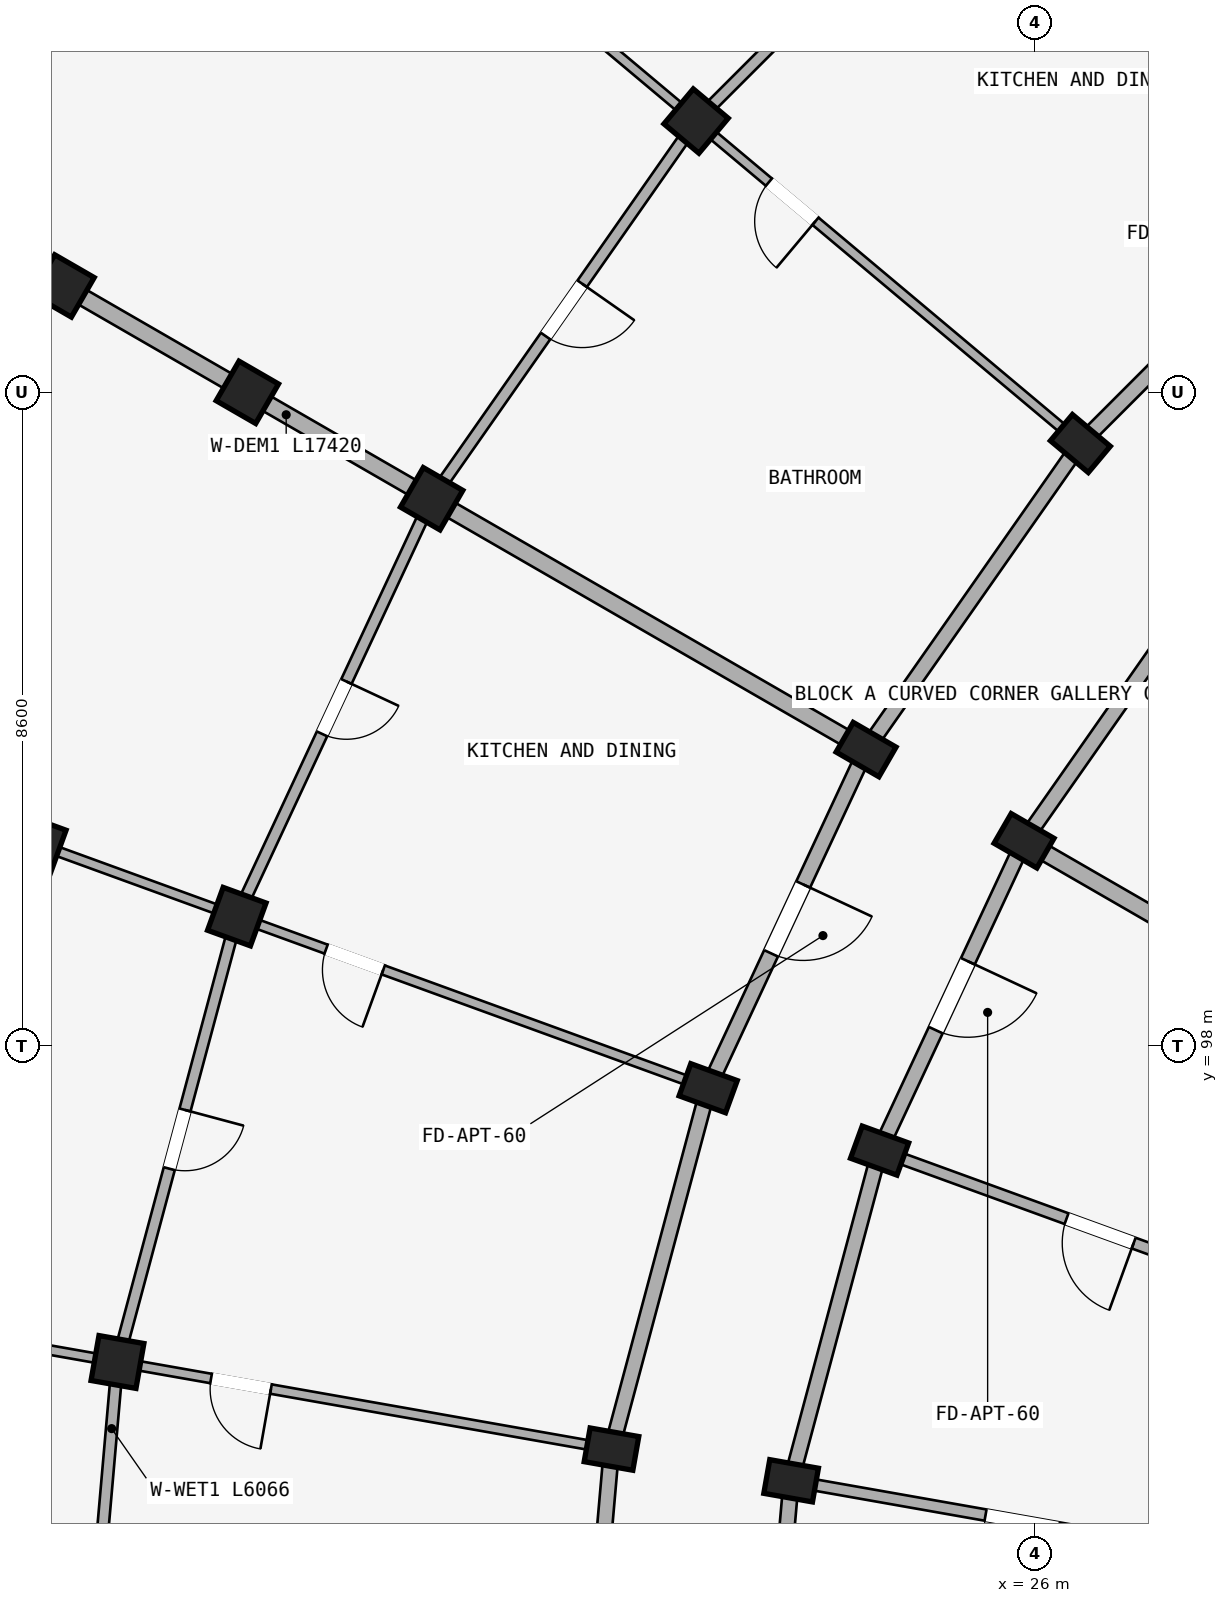
"""IFC4 building model, lengths in metres.
Left out: names, types, materials, properties, quantities, classifications, styles, units other than length and angle.
Written with IfcOpenShell. Run it as: python <this file> out.ifc"""

import sys

from ifc_helpers import new_model, si_unit, direction, frame, frame_2d, origin, origin_2d, place, context, subcontext, project, spatial, rectangle, extrude, element, fill, save


model = new_model("IFC4")
c1 = context("Model", 3, precision=1e-05, world=origin(), true_north=direction((0.0, 1.0)))
c2 = subcontext(c1, "Body", "Model", "MODEL_VIEW")
j1 = project(units=[si_unit("LENGTHUNIT", "METRE"), si_unit("PLANEANGLEUNIT", "RADIAN")], contexts=[c1])
p1 = place(None, origin())
s1 = spatial("IfcSite", under=j1, at=p1, CompositionType="ELEMENT")
p2 = place(p1, origin())
s2 = spatial("IfcBuilding", under=s1, at=p2, CompositionType="ELEMENT")
p3 = place(p2, frame((0.0, 0.0, 37.05)))
s3 = spatial("IfcBuildingStorey", under=s2, at=p3, CompositionType="ELEMENT", Elevation=37.05)
p4 = place(p3, frame((26.598, 105.927, 0.0), z_axis=(0.0, 0.0, 1.0), x_axis=(0.642787609687, 0.766044443119, 0.0)))
e1 = element("IfcColumn", 1, at=p4, inside=s3, PredefinedType="COLUMN", context=c2, shape_type="SweptSolid", body=[
    extrude(rectangle(XDim=0.45, YDim=0.65, at=origin_2d()), origin(), (0.0, 0.0, 1.0), 2.93),
])
p5 = place(p3, frame((21.542, 110.169, 0.0), z_axis=(0.0, 0.0, 1.0), x_axis=(0.642787609687, 0.766044443119, 0.0)))
e2 = element("IfcColumn", 2, at=p5, inside=s3, PredefinedType="COLUMN", context=c2, shape_type="SweptSolid", body=[
    extrude(rectangle(XDim=0.6, YDim=0.6, at=origin_2d()), origin(), (0.0, 0.0, 1.0), 2.93),
])
for number, where, z_axis, x_axis in (
    (3, (25.856, 100.7, 0.0), (0.0, 0.0, 1.0), (0.5, 0.866, 0.0)),
    (4, (23.778, 101.9, 0.0), (0.0, 0.0, 1.0), (0.5, 0.866, 0.0)),
):
    element("IfcColumn", number, at=place(p3, frame(where, z_axis=z_axis, x_axis=x_axis)), inside=s3, PredefinedType="COLUMN", context=c2, shape_type="SweptSolid", body=[
        extrude(rectangle(XDim=0.45, YDim=0.65, at=origin_2d()), origin(), (0.0, 0.0, 1.0), 2.93),
    ])
for number, where, z_axis, x_axis in (
    (5, (18.062, 105.2, 0.0), (0.0, 0.0, 1.0), (0.5, 0.866, 0.0)),
    (6, (15.637, 106.6, 0.0), (0.0, 0.0, 1.0), (0.5, 0.866, 0.0)),
    (7, (13.213, 108.0, 0.0), (0.0, 0.0, 1.0), (0.5, 0.866, 0.0)),
):
    element("IfcColumn", number, at=place(p3, frame(where, z_axis=z_axis, x_axis=x_axis)), inside=s3, PredefinedType="COLUMN", context=c2, shape_type="SweptSolid", body=[
        extrude(rectangle(XDim=0.6, YDim=0.6, at=origin_2d()), origin(), (0.0, 0.0, 1.0), 2.93),
    ])
for number, where, z_axis, x_axis in (
    (8, (23.956, 96.624, 0.0), (0.0, 0.0, 1.0), (0.342, 0.94, 0.0)),
    (9, (21.701, 97.445, 0.0), (0.0, 0.0, 1.0), (0.342, 0.94, 0.0)),
):
    element("IfcColumn", number, at=place(p3, frame(where, z_axis=z_axis, x_axis=x_axis)), inside=s3, PredefinedType="COLUMN", context=c2, shape_type="SweptSolid", body=[
        extrude(rectangle(XDim=0.45, YDim=0.65, at=origin_2d()), origin(), (0.0, 0.0, 1.0), 2.93),
    ])
for number, where, z_axis, x_axis in (
    (10, (15.499, 99.702, 0.0), (0.0, 0.0, 1.0), (0.342, 0.94, 0.0)),
    (11, (12.868, 100.66, 0.0), (0.0, 0.0, 1.0), (0.342, 0.94, 0.0)),
):
    element("IfcColumn", number, at=place(p3, frame(where, z_axis=z_axis, x_axis=x_axis)), inside=s3, PredefinedType="COLUMN", context=c2, shape_type="SweptSolid", body=[
        extrude(rectangle(XDim=0.6, YDim=0.6, at=origin_2d()), origin(), (0.0, 0.0, 1.0), 2.93),
    ])
for number, where, z_axis, x_axis in (
    (12, (22.792, 92.28, 0.0), (0.0, 0.0, 1.0), (0.174, 0.985, 0.0)),
    (13, (20.428, 92.697, 0.0), (0.0, 0.0, 1.0), (0.174, 0.985, 0.0)),
):
    element("IfcColumn", number, at=place(p3, frame(where, z_axis=z_axis, x_axis=x_axis)), inside=s3, PredefinedType="COLUMN", context=c2, shape_type="SweptSolid", body=[
        extrude(rectangle(XDim=0.45, YDim=0.65, at=origin_2d()), origin(), (0.0, 0.0, 1.0), 2.93),
    ])
p6 = place(p3, frame((13.929, 93.843, 0.0), z_axis=(0.0, 0.0, 1.0), x_axis=(0.173648177667, 0.984807753012, 0.0)))
e14 = element("IfcColumn", 14, at=p6, inside=s3, PredefinedType="COLUMN", context=c2, shape_type="SweptSolid", body=[
    extrude(rectangle(XDim=0.6, YDim=0.6, at=origin_2d()), origin(), (0.0, 0.0, 1.0), 2.93),
])
p7 = place(p3, frame((30.073, 109.402, 0.0), z_axis=(0.0, 0.0, 1.0), x_axis=(-0.707106781187, -0.707106781187, 0.0)))
e15 = element("IfcWall", 15, at=p7, inside=s3, PredefinedType="STANDARD", context=c2, shape_type="SweptSolid", body=[
    extrude(rectangle(XDim=4.916, YDim=0.2, at=frame_2d((2.458, 0.0))), origin(), (0.0, 0.0, 1.0), 2.372),
])
p8 = place(p7, frame((1.888, 0.0, 0.0)))
e16 = element("IfcOpeningElement", 16, at=p8, cuts=e15, PredefinedType="OPENING", context=c2, shape_type="SweptSolid", body=[
    extrude(rectangle(XDim=1.14, YDim=2.15, at=frame_2d((0.57, 1.075))), frame((0.0, 0.11, 0.0), z_axis=(0.0, -1.0, 0.0), x_axis=(1.0, 0.0, 0.0)), (0.0, 0.0, 1.0), 0.22),
])
p9 = place(p3, frame((28.436, 104.384, 0.0), z_axis=(0.0, 0.0, 1.0), x_axis=(-0.573571637217, -0.819155404658, 0.0)))
e17 = element("IfcWall", 17, at=p9, inside=s3, PredefinedType="STANDARD", context=c2, shape_type="SweptSolid", body=[
    extrude(rectangle(XDim=4.497, YDim=0.2, at=frame_2d((2.249, 0.0))), origin(), (0.0, 0.0, 1.0), 2.372),
])
p10 = place(p3, frame((26.598, 105.927, 0.0), z_axis=(0.0, 0.0, 1.0), x_axis=(-0.573592335331, -0.819140911474, 0.0)))
e18 = element("IfcWall", 18, at=p10, inside=s3, PredefinedType="STANDARD", context=c2, shape_type="SweptSolid", body=[
    extrude(rectangle(XDim=4.916, YDim=0.2, at=frame_2d((2.458, 0.0))), origin(), (0.0, 0.0, 1.0), 2.372),
])
p11 = place(p3, frame((25.856, 100.7, 0.0), z_axis=(0.0, 0.0, 1.0), x_axis=(-0.422617978463, -0.906307919131, 0.0)))
e19 = element("IfcWall", 19, at=p11, inside=s3, PredefinedType="STANDARD", context=c2, shape_type="SweptSolid", body=[
    extrude(rectangle(XDim=4.497, YDim=0.2, at=frame_2d((2.249, 0.0))), origin(), (0.0, 0.0, 1.0), 2.372),
])
p12 = place(p11, frame((1.749, 0.0, 0.0)))
e20 = element("IfcOpeningElement", 20, at=p12, cuts=e19, PredefinedType="OPENING", context=c2, shape_type="SweptSolid", body=[
    extrude(rectangle(XDim=1.0, YDim=2.15, at=frame_2d((0.5, 1.075))), frame((0.0, 0.11, 0.0), z_axis=(0.0, -1.0, 0.0), x_axis=(1.0, 0.0, 0.0)), (0.0, 0.0, 1.0), 0.22),
])
p13 = place(p3, frame((23.778, 101.9, 0.0), z_axis=(0.0, 0.0, 1.0), x_axis=(-0.422629854778, -0.906302381024, 0.0)))
e21 = element("IfcWall", 21, at=p13, inside=s3, PredefinedType="STANDARD", context=c2, shape_type="SweptSolid", body=[
    extrude(rectangle(XDim=4.915, YDim=0.2, at=frame_2d((2.458, 0.0))), origin(), (0.0, 0.0, 1.0), 2.372),
])
p14 = place(p13, frame((1.958, 0.0, 0.0)))
e22 = element("IfcOpeningElement", 22, at=p14, cuts=e21, PredefinedType="OPENING", context=c2, shape_type="SweptSolid", body=[
    extrude(rectangle(XDim=1.0, YDim=2.15, at=frame_2d((0.5, 1.075))), frame((0.0, 0.11, 0.0), z_axis=(0.0, -1.0, 0.0), x_axis=(1.0, 0.0, 0.0)), (0.0, 0.0, 1.0), 0.22),
])
p15 = place(p3, frame((23.956, 96.624, 0.0), z_axis=(0.0, 0.0, 1.0), x_axis=(-0.258787642463, -0.965934240054, 0.0)))
e23 = element("IfcWall", 23, at=p15, inside=s3, PredefinedType="STANDARD", context=c2, shape_type="SweptSolid", body=[
    extrude(rectangle(XDim=4.497, YDim=0.2, at=frame_2d((2.249, 0.0))), origin(), (0.0, 0.0, 1.0), 2.372),
])
p16 = place(p3, frame((21.701, 97.445, 0.0), z_axis=(0.0, 0.0, 1.0), x_axis=(-0.258803112091, -0.965930095386, 0.0)))
e24 = element("IfcWall", 24, at=p16, inside=s3, PredefinedType="STANDARD", context=c2, shape_type="SweptSolid", body=[
    extrude(rectangle(XDim=4.916, YDim=0.2, at=frame_2d((2.458, 0.0))), origin(), (0.0, 0.0, 1.0), 2.372),
])
p17 = place(p3, frame((22.792, 92.28, 0.0), z_axis=(0.0, 0.0, 1.0), x_axis=(-0.087187153726, -0.996191949488, 0.0)))
e25 = element("IfcWall", 25, at=p17, inside=s3, PredefinedType="STANDARD", context=c2, shape_type="SweptSolid", body=[
    extrude(rectangle(XDim=4.497, YDim=0.2, at=frame_2d((2.249, 0.0))), origin(), (0.0, 0.0, 1.0), 2.372),
])
p18 = place(p3, frame((20.428, 92.697, 0.0), z_axis=(0.0, 0.0, 1.0), x_axis=(-0.087167566415, -0.996193663584, 0.0)))
e26 = element("IfcWall", 26, at=p18, inside=s3, PredefinedType="STANDARD", context=c2, shape_type="SweptSolid", body=[
    extrude(rectangle(XDim=4.916, YDim=0.2, at=frame_2d((2.458, 0.0))), origin(), (0.0, 0.0, 1.0), 2.372),
])
p19 = place(p3, frame((30.009, 109.479, 0.0), z_axis=(0.0, 0.0, 1.0), x_axis=(-0.642784757967, 0.766046835987, 0.0)))
e27 = element("IfcWall", 27, at=p19, inside=s3, PredefinedType="STANDARD", context=c2, shape_type="SweptSolid", body=[
    extrude(rectangle(XDim=17.42, YDim=0.22, at=frame_2d((8.71, 0.0))), origin(), (0.0, 0.0, 1.0), 2.372),
])
p20 = place(p3, frame((26.521, 105.991, 0.0), z_axis=(0.0, 0.0, 1.0), x_axis=(-0.766046835987, 0.642784757967, 0.0)))
e28 = element("IfcWall", 28, at=p20, inside=s3, PredefinedType="PARTITIONING", context=c2, shape_type="SweptSolid", body=[
    extrude(rectangle(XDim=17.42, YDim=0.125, at=frame_2d((8.71, 0.0))), origin(), (0.0, 0.0, 1.0), 2.372),
])
p21 = place(p20, frame((4.45, 0.0, 0.0)))
e29 = element("IfcOpeningElement", 29, at=p21, cuts=e28, PredefinedType="OPENING", context=c2, shape_type="SweptSolid", body=[
    extrude(rectangle(XDim=0.8, YDim=2.1, at=frame_2d((0.4, 1.05))), frame((0.0, 0.073, 0.0), z_axis=(0.0, -1.0, 0.0), x_axis=(1.0, 0.0, 0.0)), (0.0, 0.0, 1.0), 0.145),
])
p22 = place(p3, frame((31.746, 97.3, 0.0), z_axis=(0.0, 0.0, 1.0), x_axis=(-0.866026575979, 0.499997969693, 0.0)))
e30 = element("IfcWall", 30, at=p22, inside=s3, PredefinedType="STANDARD", context=c2, shape_type="SweptSolid", body=[
    extrude(rectangle(XDim=6.75, YDim=0.22, at=frame_2d((3.375, 0.0))), origin(), (0.0, 0.0, 1.0), 2.372),
])
p23 = place(p3, frame((23.691, 101.95, 0.0), z_axis=(0.0, 0.0, 1.0), x_axis=(-0.866026648973, 0.499997843263, 0.0)))
e31 = element("IfcWall", 31, at=p23, inside=s3, PredefinedType="STANDARD", context=c2, shape_type="SweptSolid", body=[
    extrude(rectangle(XDim=17.42, YDim=0.22, at=frame_2d((8.71, 0.0))), origin(), (0.0, 0.0, 1.0), 2.372),
])
p24 = place(p3, frame((30.346, 94.298, 0.0), z_axis=(0.0, 0.0, 1.0), x_axis=(-0.939696231917, 0.342010221662, 0.0)))
e32 = element("IfcWall", 32, at=p24, inside=s3, PredefinedType="PARTITIONING", context=c2, shape_type="SweptSolid", body=[
    extrude(rectangle(XDim=6.75, YDim=0.15, at=frame_2d((3.375, 0.0))), origin(), (0.0, 0.0, 1.0), 2.372),
])
p25 = place(p24, frame((3.242, 0.0, 0.0)))
e33 = element("IfcOpeningElement", 33, at=p25, cuts=e32, PredefinedType="OPENING", context=c2, shape_type="SweptSolid", body=[
    extrude(rectangle(XDim=0.94, YDim=2.1, at=frame_2d((0.47, 1.05))), frame((0.0, 0.085, 0.0), z_axis=(0.0, -1.0, 0.0), x_axis=(1.0, 0.0, 0.0)), (0.0, 0.0, 1.0), 0.17),
])
p26 = place(p3, frame((21.607, 97.479, 0.0), z_axis=(0.0, 0.0, 1.0), x_axis=(-0.939691901159, 0.342022120477, 0.0)))
e34 = element("IfcWall", 34, at=p26, inside=s3, PredefinedType="PARTITIONING", context=c2, shape_type="SweptSolid", body=[
    extrude(rectangle(XDim=17.42, YDim=0.125, at=frame_2d((8.71, 0.0))), origin(), (0.0, 0.0, 1.0), 2.372),
])
p27 = place(p26, frame((4.45, 0.0, 0.0)))
e35 = element("IfcOpeningElement", 35, at=p27, cuts=e34, PredefinedType="OPENING", context=c2, shape_type="SweptSolid", body=[
    extrude(rectangle(XDim=0.8, YDim=2.1, at=frame_2d((0.4, 1.05))), frame((0.0, 0.073, 0.0), z_axis=(0.0, -1.0, 0.0), x_axis=(1.0, 0.0, 0.0)), (0.0, 0.0, 1.0), 0.145),
])
p28 = place(p3, frame((29.489, 91.099, 0.0), z_axis=(0.0, 0.0, 1.0), x_axis=(-0.984807944945, 0.173647089161, 0.0)))
e36 = element("IfcWall", 36, at=p28, inside=s3, PredefinedType="PARTITIONING", context=c2, shape_type="SweptSolid", body=[
    extrude(rectangle(XDim=6.75, YDim=0.15, at=frame_2d((3.375, 0.0))), origin(), (0.0, 0.0, 1.0), 2.372),
])
p29 = place(p28, frame((3.222, 0.0, 0.0)))
e37 = element("IfcOpeningElement", 37, at=p29, cuts=e36, PredefinedType="OPENING", context=c2, shape_type="SweptSolid", body=[
    extrude(rectangle(XDim=0.98, YDim=2.12, at=frame_2d((0.49, 1.06))), frame((0.0, 0.085, 0.0), z_axis=(0.0, -1.0, 0.0), x_axis=(1.0, 0.0, 0.0)), (0.0, 0.0, 1.0), 0.17),
])
p30 = place(p3, frame((20.33, 92.714, 0.0), z_axis=(0.0, 0.0, 1.0), x_axis=(-0.984808098809, 0.173646216546, 0.0)))
e38 = element("IfcWall", 38, at=p30, inside=s3, PredefinedType="PARTITIONING", context=c2, shape_type="SweptSolid", body=[
    extrude(rectangle(XDim=17.42, YDim=0.125, at=frame_2d((8.71, 0.0))), origin(), (0.0, 0.0, 1.0), 2.372),
])
p31 = place(p30, frame((4.45, 0.0, 0.0)))
e39 = element("IfcOpeningElement", 39, at=p31, cuts=e38, PredefinedType="OPENING", context=c2, shape_type="SweptSolid", body=[
    extrude(rectangle(XDim=0.8, YDim=2.1, at=frame_2d((0.4, 1.05))), frame((0.0, 0.073, 0.0), z_axis=(0.0, -1.0, 0.0), x_axis=(1.0, 0.0, 0.0)), (0.0, 0.0, 1.0), 0.145),
])
p32 = place(p3, frame((25.831, 114.458, 0.0), z_axis=(0.0, 0.0, 1.0), x_axis=(-0.707106781187, -0.707106781187, 0.0)))
e40 = element("IfcWall", 40, at=p32, inside=s3, PredefinedType="PLUMBINGWALL", context=c2, shape_type="SweptSolid", body=[
    extrude(rectangle(XDim=6.066, YDim=0.15, at=frame_2d((3.033, 0.0))), origin(), (0.0, 0.0, 1.0), 2.372),
])
p33 = place(p32, frame((2.633, 0.0, 0.0)))
e41 = element("IfcOpeningElement", 41, at=p33, cuts=e40, PredefinedType="OPENING", context=c2, shape_type="SweptSolid", body=[
    extrude(rectangle(XDim=0.8, YDim=2.1, at=frame_2d((0.4, 1.05))), frame((0.0, 0.085, 0.0), z_axis=(0.0, -1.0, 0.0), x_axis=(1.0, 0.0, 0.0)), (0.0, 0.0, 1.0), 0.17),
])
p34 = place(p3, frame((21.542, 110.169, 0.0), z_axis=(0.0, 0.0, 1.0), x_axis=(-0.573594691504, -0.81913926159, 0.0)))
e42 = element("IfcWall", 42, at=p34, inside=s3, PredefinedType="PLUMBINGWALL", context=c2, shape_type="SweptSolid", body=[
    extrude(rectangle(XDim=6.066, YDim=0.15, at=frame_2d((3.033, 0.0))), origin(), (0.0, 0.0, 1.0), 2.372),
])
p35 = place(p34, frame((2.613, 0.0, 0.0)))
e43 = element("IfcOpeningElement", 43, at=p35, cuts=e42, PredefinedType="OPENING", context=c2, shape_type="SweptSolid", body=[
    extrude(rectangle(XDim=0.84, YDim=2.1, at=frame_2d((0.42, 1.05))), frame((0.0, 0.085, 0.0), z_axis=(0.0, -1.0, 0.0), x_axis=(1.0, 0.0, 0.0)), (0.0, 0.0, 1.0), 0.17),
])
p36 = place(p3, frame((18.062, 105.2, 0.0), z_axis=(0.0, 0.0, 1.0), x_axis=(-0.42260781991, -0.906312656069, 0.0)))
e44 = element("IfcWall", 44, at=p36, inside=s3, PredefinedType="PLUMBINGWALL", context=c2, shape_type="SweptSolid", body=[
    extrude(rectangle(XDim=6.066, YDim=0.15, at=frame_2d((3.033, 0.0))), origin(), (0.0, 0.0, 1.0), 2.372),
])
p37 = place(p36, frame((2.653, 0.0, 0.0)))
e45 = element("IfcOpeningElement", 45, at=p37, cuts=e44, PredefinedType="OPENING", context=c2, shape_type="SweptSolid", body=[
    extrude(rectangle(XDim=0.76, YDim=2.05, at=frame_2d((0.38, 1.025))), frame((0.0, 0.085, 0.0), z_axis=(0.0, -1.0, 0.0), x_axis=(1.0, 0.0, 0.0)), (0.0, 0.0, 1.0), 0.17),
])
p38 = place(p3, frame((15.499, 99.702, 0.0), z_axis=(0.0, 0.0, 1.0), x_axis=(-0.258827283048, -0.965923618901, 0.0)))
e46 = element("IfcWall", 46, at=p38, inside=s3, PredefinedType="PLUMBINGWALL", context=c2, shape_type="SweptSolid", body=[
    extrude(rectangle(XDim=6.066, YDim=0.15, at=frame_2d((3.033, 0.0))), origin(), (0.0, 0.0, 1.0), 2.372),
])
p39 = place(p38, frame((2.633, 0.0, 0.0)))
e47 = element("IfcOpeningElement", 47, at=p39, cuts=e46, PredefinedType="OPENING", context=c2, shape_type="SweptSolid", body=[
    extrude(rectangle(XDim=0.8, YDim=2.1, at=frame_2d((0.4, 1.05))), frame((0.0, 0.085, 0.0), z_axis=(0.0, -1.0, 0.0), x_axis=(1.0, 0.0, 0.0)), (0.0, 0.0, 1.0), 0.17),
])
p40 = place(p3, frame((13.929, 93.843, 0.0), z_axis=(0.0, 0.0, 1.0), x_axis=(-0.087174938512, -0.996193018494, 0.0)))
e48 = element("IfcWall", 48, at=p40, inside=s3, PredefinedType="PLUMBINGWALL", context=c2, shape_type="SweptSolid", body=[
    extrude(rectangle(XDim=6.066, YDim=0.15, at=frame_2d((3.033, 0.0))), origin(), (0.0, 0.0, 1.0), 2.372),
])
p41 = place(p40, frame((2.613, 0.0, 0.0)))
e49 = element("IfcOpeningElement", 49, at=p41, cuts=e48, PredefinedType="OPENING", context=c2, shape_type="SweptSolid", body=[
    extrude(rectangle(XDim=0.84, YDim=2.1, at=frame_2d((0.42, 1.05))), frame((0.0, 0.085, 0.0), z_axis=(0.0, -1.0, 0.0), x_axis=(1.0, 0.0, 0.0)), (0.0, 0.0, 1.0), 0.17),
])
p42 = place(p21, frame((0.8, 0.0, 0.0), z_axis=(0.0, 0.0, 1.0), x_axis=(-1.0, 0.0, 0.0)))
e50 = element("IfcDoor", 50, at=p42, inside=s3, OperationType="SINGLE_SWING_RIGHT", PredefinedType="DOOR", context=c2, shape_type="SweptSolid", body=[
    extrude(rectangle(XDim=0.8, YDim=2.1, at=frame_2d((0.4, 1.05))), frame((0.0, 0.025, 0.0), z_axis=(0.0, -1.0, 0.0), x_axis=(1.0, 0.0, 0.0)), (0.0, 0.0, 1.0), 0.05),
])
fill(e29, e50)
p43 = place(p25, origin())
e51 = element("IfcDoor", 51, at=p43, inside=s3, OperationType="SINGLE_SWING_LEFT", PredefinedType="DOOR", context=c2, shape_type="SweptSolid", body=[
    extrude(rectangle(XDim=0.94, YDim=2.1, at=frame_2d((0.47, 1.05))), frame((0.0, 0.025, 0.0), z_axis=(0.0, -1.0, 0.0), x_axis=(1.0, 0.0, 0.0)), (0.0, 0.0, 1.0), 0.05),
])
fill(e33, e51)
p44 = place(p27, frame((0.8, 0.0, 0.0), z_axis=(0.0, 0.0, 1.0), x_axis=(-1.0, 0.0, 0.0)))
e52 = element("IfcDoor", 52, at=p44, inside=s3, OperationType="SINGLE_SWING_RIGHT", PredefinedType="DOOR", context=c2, shape_type="SweptSolid", body=[
    extrude(rectangle(XDim=0.8, YDim=2.1, at=frame_2d((0.4, 1.05))), frame((0.0, 0.025, 0.0), z_axis=(0.0, -1.0, 0.0), x_axis=(1.0, 0.0, 0.0)), (0.0, 0.0, 1.0), 0.05),
])
fill(e35, e52)
p45 = place(p29, origin())
e53 = element("IfcDoor", 53, at=p45, inside=s3, OperationType="SINGLE_SWING_LEFT", PredefinedType="DOOR", context=c2, shape_type="SweptSolid", body=[
    extrude(rectangle(XDim=0.98, YDim=2.12, at=frame_2d((0.49, 1.06))), frame((0.0, 0.025, 0.0), z_axis=(0.0, -1.0, 0.0), x_axis=(1.0, 0.0, 0.0)), (0.0, 0.0, 1.0), 0.05),
])
fill(e37, e53)
p46 = place(p31, frame((0.8, 0.0, 0.0), z_axis=(0.0, 0.0, 1.0), x_axis=(-1.0, 0.0, 0.0)))
e54 = element("IfcDoor", 54, at=p46, inside=s3, OperationType="SINGLE_SWING_RIGHT", PredefinedType="DOOR", context=c2, shape_type="SweptSolid", body=[
    extrude(rectangle(XDim=0.8, YDim=2.1, at=frame_2d((0.4, 1.05))), frame((0.0, 0.025, 0.0), z_axis=(0.0, -1.0, 0.0), x_axis=(1.0, 0.0, 0.0)), (0.0, 0.0, 1.0), 0.05),
])
fill(e39, e54)
p47 = place(p35, origin())
e55 = element("IfcDoor", 55, at=p47, inside=s3, OperationType="SINGLE_SWING_LEFT", PredefinedType="DOOR", context=c2, shape_type="SweptSolid", body=[
    extrude(rectangle(XDim=0.84, YDim=2.1, at=frame_2d((0.42, 1.05))), frame((0.0, 0.025, 0.0), z_axis=(0.0, -1.0, 0.0), x_axis=(1.0, 0.0, 0.0)), (0.0, 0.0, 1.0), 0.05),
])
fill(e43, e55)
p48 = place(p14, frame((1.0, 0.0, 0.0), z_axis=(0.0, 0.0, 1.0), x_axis=(-1.0, 0.0, 0.0)))
e56 = element("IfcDoor", 56, at=p48, inside=s3, OperationType="SINGLE_SWING_RIGHT", PredefinedType="DOOR", context=c2, shape_type="SweptSolid", body=[
    extrude(rectangle(XDim=1.0, YDim=2.15, at=frame_2d((0.5, 1.075))), frame((0.0, 0.025, 0.0), z_axis=(0.0, -1.0, 0.0), x_axis=(1.0, 0.0, 0.0)), (0.0, 0.0, 1.0), 0.05),
])
fill(e22, e56)
p49 = place(p37, origin())
e57 = element("IfcDoor", 57, at=p49, inside=s3, OperationType="SINGLE_SWING_LEFT", PredefinedType="DOOR", context=c2, shape_type="SweptSolid", body=[
    extrude(rectangle(XDim=0.76, YDim=2.05, at=frame_2d((0.38, 1.025))), frame((0.0, 0.025, 0.0), z_axis=(0.0, -1.0, 0.0), x_axis=(1.0, 0.0, 0.0)), (0.0, 0.0, 1.0), 0.05),
])
fill(e45, e57)
p50 = place(p39, frame((0.8, 0.0, 0.0), z_axis=(0.0, 0.0, 1.0), x_axis=(-1.0, 0.0, 0.0)))
e58 = element("IfcDoor", 58, at=p50, inside=s3, OperationType="SINGLE_SWING_RIGHT", PredefinedType="DOOR", context=c2, shape_type="SweptSolid", body=[
    extrude(rectangle(XDim=0.8, YDim=2.1, at=frame_2d((0.4, 1.05))), frame((0.0, 0.025, 0.0), z_axis=(0.0, -1.0, 0.0), x_axis=(1.0, 0.0, 0.0)), (0.0, 0.0, 1.0), 0.05),
])
fill(e47, e58)
p51 = place(p12, frame((1.0, 0.0, 0.0), z_axis=(0.0, 0.0, 1.0), x_axis=(-1.0, 0.0, 0.0)))
e59 = element("IfcDoor", 59, at=p51, inside=s3, OperationType="SINGLE_SWING_RIGHT", PredefinedType="DOOR", context=c2, shape_type="SweptSolid", body=[
    extrude(rectangle(XDim=1.0, YDim=2.15, at=frame_2d((0.5, 1.075))), frame((0.0, 0.025, 0.0), z_axis=(0.0, -1.0, 0.0), x_axis=(1.0, 0.0, 0.0)), (0.0, 0.0, 1.0), 0.05),
])
fill(e20, e59)
save(model, sys.argv[1])
